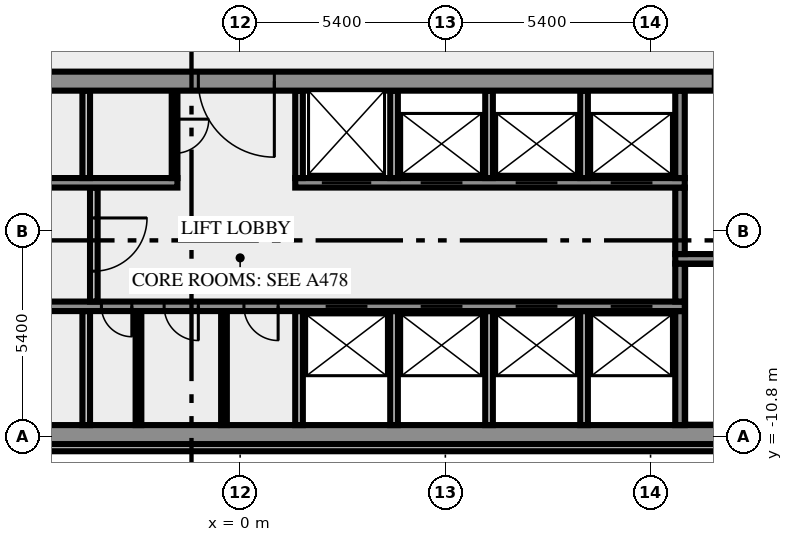
"""IFC4 building model, lengths in metres.
Left out: names, types, materials, properties, quantities, classifications, styles, units other than length and angle.
Written with IfcOpenShell. Run it as: python <this file> out.ifc"""

import sys

from ifc_helpers import new_model, si_unit, direction, frame, frame_2d, origin, place, context, subcontext, project, spatial, rectangle, extrude, element, fill, save


model = new_model("IFC4")
c1 = context("Model", 3, precision=1e-05, world=origin(), true_north=direction((0.0, 1.0)))
c2 = subcontext(c1, "Body", "Model", "MODEL_VIEW")
j1 = project(units=[si_unit("LENGTHUNIT", "METRE"), si_unit("PLANEANGLEUNIT", "RADIAN")], contexts=[c1])
p1 = place(None, origin())
s1 = spatial("IfcSite", under=j1, at=p1, CompositionType="ELEMENT")
p2 = place(p1, origin())
s2 = spatial("IfcBuilding", under=s1, at=p2, CompositionType="ELEMENT")
p3 = place(p2, frame((0.0, 0.0, 144.0)))
s3 = spatial("IfcBuildingStorey", under=s2, at=p3, CompositionType="ELEMENT", Elevation=144.0)
p4 = place(p3, frame((-17.444, -11.088, 0.0), z_axis=(0.0, 0.0, 1.0), x_axis=(1.0, 0.0, 0.0)))
e1 = element("IfcWall", 1, at=p4, inside=s3, PredefinedType="SOLIDWALL", context=c2, shape_type="SweptSolid", body=[
    extrude(rectangle(XDim=34.888, YDim=0.2, at=frame_2d((17.444, 0.0))), origin(), (0.0, 0.0, 1.0), 3.65),
])
p5 = place(p3, frame((-20.0, -10.75, 0.0), z_axis=(0.0, 0.0, 1.0), x_axis=(1.0, 0.0, 0.0)))
e2 = element("IfcWall", 2, at=p5, inside=s3, PredefinedType="SHEAR", context=c2, shape_type="SweptSolid", body=[
    extrude(rectangle(XDim=40.0, YDim=0.5, at=frame_2d((20.0, 0.0))), origin(), (0.0, 0.0, 1.0), 3.65),
])
p6 = place(p5, frame((0.8, 0.0, 1.0)))
e3 = element("IfcOpeningElement", 3, at=p6, cuts=e2, PredefinedType="OPENING", context=c2, shape_type="SweptSolid", body=[
    extrude(rectangle(XDim=1.2, YDim=1.2, at=frame_2d((0.6, 0.6))), frame((0.0, 0.26, 0.0), z_axis=(0.0, -1.0, 0.0), x_axis=(1.0, 0.0, 0.0)), (0.0, 0.0, 1.0), 0.52),
])
p7 = place(p5, frame((38.0, 0.0, 1.0)))
e4 = element("IfcOpeningElement", 4, at=p7, cuts=e2, PredefinedType="OPENING", context=c2, shape_type="SweptSolid", body=[
    extrude(rectangle(XDim=1.2, YDim=1.2, at=frame_2d((0.6, 0.6))), frame((0.0, 0.26, 0.0), z_axis=(0.0, -1.0, 0.0), x_axis=(1.0, 0.0, 0.0)), (0.0, 0.0, 1.0), 0.52),
])
p8 = place(p3, frame((-4.05, -10.5, 0.0), z_axis=(0.0, 0.0, 1.0), x_axis=(0.0, 1.0, 0.0)))
e5 = element("IfcWall", 5, at=p8, inside=s3, PredefinedType="SOLIDWALL", context=c2, shape_type="SweptSolid", body=[
    extrude(rectangle(XDim=3.0, YDim=0.2, at=frame_2d((1.5, 0.0))), origin(), (0.0, 0.0, 1.0), 3.65),
])
for number, where, z_axis, x_axis in (
    (6, (-2.675, -10.5, 0.0), (0.0, 0.0, 1.0), (0.0, 1.0, 0.0)),
    (7, (-0.425, -10.5, 0.0), (0.0, 0.0, 1.0), (0.0, 1.0, 0.0)),
):
    element("IfcWall", number, at=place(p3, frame(where, z_axis=z_axis, x_axis=x_axis)), inside=s3, PredefinedType="PARTITIONING", context=c2, shape_type="SweptSolid", body=[
        extrude(rectangle(XDim=3.0, YDim=0.15, at=frame_2d((1.5, 0.0))), origin(), (0.0, 0.0, 1.0), 3.65),
    ])
for number, where, z_axis, x_axis in (
    (8, (1.55, -10.5, 0.0), (0.0, 0.0, 1.0), (0.0, 1.0, 0.0)),
    (9, (4.05, -10.5, 0.0), (0.0, 0.0, 1.0), (0.0, 1.0, 0.0)),
    (10, (6.55, -10.5, 0.0), (0.0, 0.0, 1.0), (0.0, 1.0, 0.0)),
    (11, (9.05, -10.5, 0.0), (0.0, 0.0, 1.0), (0.0, 1.0, 0.0)),
):
    element("IfcWall", number, at=place(p3, frame(where, z_axis=z_axis, x_axis=x_axis)), inside=s3, PredefinedType="SOLIDWALL", context=c2, shape_type="SweptSolid", body=[
        extrude(rectangle(XDim=3.0, YDim=0.2, at=frame_2d((1.5, 0.0))), origin(), (0.0, 0.0, 1.0), 3.65),
    ])
p9 = place(p3, frame((11.575, -10.5, 0.0), z_axis=(0.0, 0.0, 1.0), x_axis=(0.0, 1.0, 0.0)))
e12 = element("IfcWall", 12, at=p9, inside=s3, PredefinedType="SHEAR", context=c2, shape_type="SweptSolid", body=[
    extrude(rectangle(XDim=3.0, YDim=0.25, at=frame_2d((1.5, 0.0))), origin(), (0.0, 0.0, 1.0), 3.65),
])
p10 = place(p3, frame((11.7, -7.375, 0.0), z_axis=(0.0, 0.0, 1.0), x_axis=(-1.0, 0.0, 0.0)))
e13 = element("IfcWall", 13, at=p10, inside=s3, PredefinedType="SHEAR", context=c2, shape_type="SweptSolid", body=[
    extrude(rectangle(XDim=23.4, YDim=0.25, at=frame_2d((11.7, 0.0))), origin(), (0.0, 0.0, 1.0), 3.65),
])
p11 = place(p10, frame((21.812, 0.0, 0.0)))
e14 = element("IfcOpeningElement", 14, at=p11, cuts=e13, PredefinedType="OPENING", context=c2, shape_type="SweptSolid", body=[
    extrude(rectangle(XDim=0.9, YDim=2.1, at=frame_2d((0.45, 1.05))), frame((0.0, 0.135, 0.0), z_axis=(0.0, -1.0, 0.0), x_axis=(1.0, 0.0, 0.0)), (0.0, 0.0, 1.0), 0.27),
])
p12 = place(p10, frame((19.55, 0.0, 0.0)))
e15 = element("IfcOpeningElement", 15, at=p12, cuts=e13, PredefinedType="OPENING", context=c2, shape_type="SweptSolid", body=[
    extrude(rectangle(XDim=0.9, YDim=2.1, at=frame_2d((0.45, 1.05))), frame((0.0, 0.135, 0.0), z_axis=(0.0, -1.0, 0.0), x_axis=(1.0, 0.0, 0.0)), (0.0, 0.0, 1.0), 0.27),
])
p13 = place(p10, frame((16.787, 0.0, 0.0)))
e16 = element("IfcOpeningElement", 16, at=p13, cuts=e13, PredefinedType="OPENING", context=c2, shape_type="SweptSolid", body=[
    extrude(rectangle(XDim=0.9, YDim=2.1, at=frame_2d((0.45, 1.05))), frame((0.0, 0.135, 0.0), z_axis=(0.0, -1.0, 0.0), x_axis=(1.0, 0.0, 0.0)), (0.0, 0.0, 1.0), 0.27),
])
p14 = place(p10, frame((14.55, 0.0, 0.0)))
e17 = element("IfcOpeningElement", 17, at=p14, cuts=e13, PredefinedType="OPENING", context=c2, shape_type="SweptSolid", body=[
    extrude(rectangle(XDim=0.8, YDim=2.1, at=frame_2d((0.4, 1.05))), frame((0.0, 0.135, 0.0), z_axis=(0.0, -1.0, 0.0), x_axis=(1.0, 0.0, 0.0)), (0.0, 0.0, 1.0), 0.27),
])
p15 = place(p10, frame((12.8, 0.0, 0.0)))
e18 = element("IfcOpeningElement", 18, at=p15, cuts=e13, PredefinedType="OPENING", context=c2, shape_type="SweptSolid", body=[
    extrude(rectangle(XDim=0.9, YDim=2.1, at=frame_2d((0.45, 1.05))), frame((0.0, 0.135, 0.0), z_axis=(0.0, -1.0, 0.0), x_axis=(1.0, 0.0, 0.0)), (0.0, 0.0, 1.0), 0.27),
])
p16 = place(p10, frame((10.7, 0.0, 0.0)))
e19 = element("IfcOpeningElement", 19, at=p16, cuts=e13, PredefinedType="OPENING", context=c2, shape_type="SweptSolid", body=[
    extrude(rectangle(XDim=0.9, YDim=2.1, at=frame_2d((0.45, 1.05))), frame((0.0, 0.135, 0.0), z_axis=(0.0, -1.0, 0.0), x_axis=(1.0, 0.0, 0.0)), (0.0, 0.0, 1.0), 0.27),
])
p17 = place(p10, frame((8.35, 0.0, 0.0)))
e20 = element("IfcOpeningElement", 20, at=p17, cuts=e13, PredefinedType="OPENING", context=c2, shape_type="SweptSolid", body=[
    extrude(rectangle(XDim=1.1, YDim=2.1, at=frame_2d((0.55, 1.05))), frame((0.0, 0.135, 0.0), z_axis=(0.0, -1.0, 0.0), x_axis=(1.0, 0.0, 0.0)), (0.0, 0.0, 1.0), 0.27),
])
p18 = place(p10, frame((5.85, 0.0, 0.0)))
e21 = element("IfcOpeningElement", 21, at=p18, cuts=e13, PredefinedType="OPENING", context=c2, shape_type="SweptSolid", body=[
    extrude(rectangle(XDim=1.1, YDim=2.1, at=frame_2d((0.55, 1.05))), frame((0.0, 0.135, 0.0), z_axis=(0.0, -1.0, 0.0), x_axis=(1.0, 0.0, 0.0)), (0.0, 0.0, 1.0), 0.27),
])
p19 = place(p10, frame((3.35, 0.0, 0.0)))
e22 = element("IfcOpeningElement", 22, at=p19, cuts=e13, PredefinedType="OPENING", context=c2, shape_type="SweptSolid", body=[
    extrude(rectangle(XDim=1.1, YDim=2.1, at=frame_2d((0.55, 1.05))), frame((0.0, 0.135, 0.0), z_axis=(0.0, -1.0, 0.0), x_axis=(1.0, 0.0, 0.0)), (0.0, 0.0, 1.0), 0.27),
])
p20 = place(p10, frame((0.85, 0.0, 0.0)))
e23 = element("IfcOpeningElement", 23, at=p20, cuts=e13, PredefinedType="OPENING", context=c2, shape_type="SweptSolid", body=[
    extrude(rectangle(XDim=1.1, YDim=2.1, at=frame_2d((0.55, 1.05))), frame((0.0, 0.135, 0.0), z_axis=(0.0, -1.0, 0.0), x_axis=(1.0, 0.0, 0.0)), (0.0, 0.0, 1.0), 0.27),
])
p21 = place(p3, frame((-3.85, -4.25, 0.0), z_axis=(0.0, 0.0, 1.0), x_axis=(0.0, -1.0, 0.0)))
e24 = element("IfcWall", 24, at=p21, inside=s3, PredefinedType="SOLIDWALL", context=c2, shape_type="SweptSolid", body=[
    extrude(rectangle(XDim=3.0, YDim=0.2, at=frame_2d((1.5, 0.0))), origin(), (0.0, 0.0, 1.0), 3.65),
])
p22 = place(p21, frame((0.8, 0.0, 0.0)))
e25 = element("IfcOpeningElement", 25, at=p22, cuts=e24, PredefinedType="OPENING", context=c2, shape_type="SweptSolid", body=[
    extrude(rectangle(XDim=1.4, YDim=2.1, at=frame_2d((0.7, 1.05))), frame((0.0, 0.11, 0.0), z_axis=(0.0, -1.0, 0.0), x_axis=(1.0, 0.0, 0.0)), (0.0, 0.0, 1.0), 0.22),
])
p23 = place(p3, frame((11.575, -7.25, 0.0), z_axis=(0.0, 0.0, 1.0), x_axis=(0.0, 1.0, 0.0)))
e26 = element("IfcWall", 26, at=p23, inside=s3, PredefinedType="SHEAR", context=c2, shape_type="SweptSolid", body=[
    extrude(rectangle(XDim=1.0, YDim=0.25, at=frame_2d((0.5, 0.0))), origin(), (0.0, 0.0, 1.0), 3.65),
])
p24 = place(p3, frame((19.5, -6.125, 0.0), z_axis=(0.0, 0.0, 1.0), x_axis=(-1.0, 0.0, 0.0)))
e27 = element("IfcWall", 27, at=p24, inside=s3, PredefinedType="SHEAR", context=c2, shape_type="SweptSolid", body=[
    extrude(rectangle(XDim=8.05, YDim=0.25, at=frame_2d((4.025, 0.0))), origin(), (0.0, 0.0, 1.0), 3.65),
])
p25 = place(p24, frame((0.05, 0.0, 0.0)))
e28 = element("IfcOpeningElement", 28, at=p25, cuts=e27, PredefinedType="OPENING", context=c2, shape_type="SweptSolid", body=[
    extrude(rectangle(XDim=1.8, YDim=2.1, at=frame_2d((0.9, 1.05))), frame((0.0, 0.135, 0.0), z_axis=(0.0, -1.0, 0.0), x_axis=(1.0, 0.0, 0.0)), (0.0, 0.0, 1.0), 0.27),
])
p26 = place(p3, frame((11.575, -6.0, 0.0), z_axis=(0.0, 0.0, 1.0), x_axis=(0.0, 1.0, 0.0)))
e29 = element("IfcWall", 29, at=p26, inside=s3, PredefinedType="SHEAR", context=c2, shape_type="SweptSolid", body=[
    extrude(rectangle(XDim=1.75, YDim=0.25, at=frame_2d((0.875, 0.0))), origin(), (0.0, 0.0, 1.0), 3.65),
])
p27 = place(p3, frame((-11.7, -4.125, 0.0), z_axis=(0.0, 0.0, 1.0), x_axis=(1.0, 0.0, 0.0)))
e30 = element("IfcWall", 30, at=p27, inside=s3, PredefinedType="SHEAR", context=c2, shape_type="SweptSolid", body=[
    extrude(rectangle(XDim=10.05, YDim=0.25, at=frame_2d((5.025, 0.0))), origin(), (0.0, 0.0, 1.0), 3.65),
])
p28 = place(p3, frame((1.45, -4.125, 0.0), z_axis=(0.0, 0.0, 1.0), x_axis=(1.0, 0.0, 0.0)))
e31 = element("IfcWall", 31, at=p28, inside=s3, PredefinedType="SHEAR", context=c2, shape_type="SweptSolid", body=[
    extrude(rectangle(XDim=10.25, YDim=0.25, at=frame_2d((5.125, 0.0))), origin(), (0.0, 0.0, 1.0), 3.65),
])
p29 = place(p28, frame((0.7, 0.0, 0.0)))
e32 = element("IfcOpeningElement", 32, at=p29, cuts=e31, PredefinedType="OPENING", context=c2, shape_type="SweptSolid", body=[
    extrude(rectangle(XDim=1.3, YDim=2.1, at=frame_2d((0.65, 1.05))), frame((0.0, 0.135, 0.0), z_axis=(0.0, -1.0, 0.0), x_axis=(1.0, 0.0, 0.0)), (0.0, 0.0, 1.0), 0.27),
])
p30 = place(p28, frame((3.3, 0.0, 0.0)))
e33 = element("IfcOpeningElement", 33, at=p30, cuts=e31, PredefinedType="OPENING", context=c2, shape_type="SweptSolid", body=[
    extrude(rectangle(XDim=1.1, YDim=2.1, at=frame_2d((0.55, 1.05))), frame((0.0, 0.135, 0.0), z_axis=(0.0, -1.0, 0.0), x_axis=(1.0, 0.0, 0.0)), (0.0, 0.0, 1.0), 0.27),
])
p31 = place(p28, frame((5.8, 0.0, 0.0)))
e34 = element("IfcOpeningElement", 34, at=p31, cuts=e31, PredefinedType="OPENING", context=c2, shape_type="SweptSolid", body=[
    extrude(rectangle(XDim=1.1, YDim=2.1, at=frame_2d((0.55, 1.05))), frame((0.0, 0.135, 0.0), z_axis=(0.0, -1.0, 0.0), x_axis=(1.0, 0.0, 0.0)), (0.0, 0.0, 1.0), 0.27),
])
p32 = place(p28, frame((8.3, 0.0, 0.0)))
e35 = element("IfcOpeningElement", 35, at=p32, cuts=e31, PredefinedType="OPENING", context=c2, shape_type="SweptSolid", body=[
    extrude(rectangle(XDim=1.1, YDim=2.1, at=frame_2d((0.55, 1.05))), frame((0.0, 0.135, 0.0), z_axis=(0.0, -1.0, 0.0), x_axis=(1.0, 0.0, 0.0)), (0.0, 0.0, 1.0), 0.27),
])
p33 = place(p3, frame((-4.05, -4.0, 0.0), z_axis=(0.0, 0.0, 1.0), x_axis=(0.0, 1.0, 0.0)))
e36 = element("IfcWall", 36, at=p33, inside=s3, PredefinedType="SOLIDWALL", context=c2, shape_type="SweptSolid", body=[
    extrude(rectangle(XDim=2.3, YDim=0.2, at=frame_2d((1.15, 0.0))), origin(), (0.0, 0.0, 1.0), 3.65),
])
p34 = place(p3, frame((-1.725, -1.7, 0.0), z_axis=(0.0, 0.0, 1.0), x_axis=(0.0, -1.0, 0.0)))
e37 = element("IfcWall", 37, at=p34, inside=s3, PredefinedType="PARTITIONING", context=c2, shape_type="SweptSolid", body=[
    extrude(rectangle(XDim=2.3, YDim=0.15, at=frame_2d((1.15, 0.0))), origin(), (0.0, 0.0, 1.0), 3.65),
])
p35 = place(p34, frame((0.75, 0.0, 0.0)))
e38 = element("IfcOpeningElement", 38, at=p35, cuts=e37, PredefinedType="OPENING", context=c2, shape_type="SweptSolid", body=[
    extrude(rectangle(XDim=0.9, YDim=2.1, at=frame_2d((0.45, 1.05))), frame((0.0, 0.085, 0.0), z_axis=(0.0, -1.0, 0.0), x_axis=(1.0, 0.0, 0.0)), (0.0, 0.0, 1.0), 0.17),
])
for number, where, z_axis, x_axis in (
    (39, (1.55, -4.0, 0.0), (0.0, 0.0, 1.0), (0.0, 1.0, 0.0)),
    (40, (4.05, -4.0, 0.0), (0.0, 0.0, 1.0), (0.0, 1.0, 0.0)),
    (41, (6.55, -4.0, 0.0), (0.0, 0.0, 1.0), (0.0, 1.0, 0.0)),
    (42, (9.05, -4.0, 0.0), (0.0, 0.0, 1.0), (0.0, 1.0, 0.0)),
):
    element("IfcWall", number, at=place(p3, frame(where, z_axis=z_axis, x_axis=x_axis)), inside=s3, PredefinedType="SOLIDWALL", context=c2, shape_type="SweptSolid", body=[
        extrude(rectangle(XDim=2.3, YDim=0.2, at=frame_2d((1.15, 0.0))), origin(), (0.0, 0.0, 1.0), 3.65),
    ])
p36 = place(p3, frame((11.575, -4.0, 0.0), z_axis=(0.0, 0.0, 1.0), x_axis=(0.0, 1.0, 0.0)))
e43 = element("IfcWall", 43, at=p36, inside=s3, PredefinedType="SHEAR", context=c2, shape_type="SweptSolid", body=[
    extrude(rectangle(XDim=2.3, YDim=0.25, at=frame_2d((1.15, 0.0))), origin(), (0.0, 0.0, 1.0), 3.65),
])
p37 = place(p3, frame((20.49, -1.45, 0.0), z_axis=(0.0, 0.0, 1.0), x_axis=(-1.0, 0.0, 0.0)))
e44 = element("IfcWall", 44, at=p37, inside=s3, PredefinedType="SHEAR", context=c2, shape_type="SweptSolid", body=[
    extrude(rectangle(XDim=40.98, YDim=0.5, at=frame_2d((20.49, 0.0))), origin(), (0.0, 0.0, 1.0), 3.65),
])
p38 = place(p37, frame((38.14, 0.0, 0.0)))
e45 = element("IfcOpeningElement", 45, at=p38, cuts=e44, PredefinedType="OPENING", context=c2, shape_type="SweptSolid", body=[
    extrude(rectangle(XDim=1.8, YDim=2.1, at=frame_2d((0.9, 1.05))), frame((0.0, 0.26, 0.0), z_axis=(0.0, -1.0, 0.0), x_axis=(1.0, 0.0, 0.0)), (0.0, 0.0, 1.0), 0.52),
])
p39 = place(p37, frame((35.89, 0.0, 0.0)))
e46 = element("IfcOpeningElement", 46, at=p39, cuts=e44, PredefinedType="OPENING", context=c2, shape_type="SweptSolid", body=[
    extrude(rectangle(XDim=0.9, YDim=2.1, at=frame_2d((0.45, 1.05))), frame((0.0, 0.26, 0.0), z_axis=(0.0, -1.0, 0.0), x_axis=(1.0, 0.0, 0.0)), (0.0, 0.0, 1.0), 0.52),
])
p40 = place(p37, frame((32.94, 0.0, 0.0)))
e47 = element("IfcOpeningElement", 47, at=p40, cuts=e44, PredefinedType="OPENING", context=c2, shape_type="SweptSolid", body=[
    extrude(rectangle(XDim=0.9, YDim=2.1, at=frame_2d((0.45, 1.05))), frame((0.0, 0.26, 0.0), z_axis=(0.0, -1.0, 0.0), x_axis=(1.0, 0.0, 0.0)), (0.0, 0.0, 1.0), 0.52),
])
p41 = place(p37, frame((29.802, 0.0, 0.0)))
e48 = element("IfcOpeningElement", 48, at=p41, cuts=e44, PredefinedType="OPENING", context=c2, shape_type="SweptSolid", body=[
    extrude(rectangle(XDim=0.9, YDim=2.1, at=frame_2d((0.45, 1.05))), frame((0.0, 0.26, 0.0), z_axis=(0.0, -1.0, 0.0), x_axis=(1.0, 0.0, 0.0)), (0.0, 0.0, 1.0), 0.52),
])
p42 = place(p37, frame((26.077, 0.0, 0.0)))
e49 = element("IfcOpeningElement", 49, at=p42, cuts=e44, PredefinedType="OPENING", context=c2, shape_type="SweptSolid", body=[
    extrude(rectangle(XDim=0.9, YDim=2.1, at=frame_2d((0.45, 1.05))), frame((0.0, 0.26, 0.0), z_axis=(0.0, -1.0, 0.0), x_axis=(1.0, 0.0, 0.0)), (0.0, 0.0, 1.0), 0.52),
])
p43 = place(p37, frame((19.59, 0.0, 0.0)))
e50 = element("IfcOpeningElement", 50, at=p43, cuts=e44, PredefinedType="OPENING", context=c2, shape_type="SweptSolid", body=[
    extrude(rectangle(XDim=2.0, YDim=2.1, at=frame_2d((1.0, 1.05))), frame((0.0, 0.26, 0.0), z_axis=(0.0, -1.0, 0.0), x_axis=(1.0, 0.0, 0.0)), (0.0, 0.0, 1.0), 0.52),
])
p44 = place(p37, frame((7.14, 0.0, 0.0)))
e51 = element("IfcOpeningElement", 51, at=p44, cuts=e44, PredefinedType="OPENING", context=c2, shape_type="SweptSolid", body=[
    extrude(rectangle(XDim=0.9, YDim=2.1, at=frame_2d((0.45, 1.05))), frame((0.0, 0.26, 0.0), z_axis=(0.0, -1.0, 0.0), x_axis=(1.0, 0.0, 0.0)), (0.0, 0.0, 1.0), 0.52),
])
p45 = place(p37, frame((5.028, 0.0, 0.0)))
e52 = element("IfcOpeningElement", 52, at=p45, cuts=e44, PredefinedType="OPENING", context=c2, shape_type="SweptSolid", body=[
    extrude(rectangle(XDim=0.8, YDim=2.1, at=frame_2d((0.4, 1.05))), frame((0.0, 0.26, 0.0), z_axis=(0.0, -1.0, 0.0), x_axis=(1.0, 0.0, 0.0)), (0.0, 0.0, 1.0), 0.52),
])
p46 = place(p37, frame((3.452, 0.0, 0.0)))
e53 = element("IfcOpeningElement", 53, at=p46, cuts=e44, PredefinedType="OPENING", context=c2, shape_type="SweptSolid", body=[
    extrude(rectangle(XDim=0.8, YDim=2.1, at=frame_2d((0.4, 1.05))), frame((0.0, 0.26, 0.0), z_axis=(0.0, -1.0, 0.0), x_axis=(1.0, 0.0, 0.0)), (0.0, 0.0, 1.0), 0.52),
])
p47 = place(p37, frame((1.04, 0.0, 0.0)))
e54 = element("IfcOpeningElement", 54, at=p47, cuts=e44, PredefinedType="OPENING", context=c2, shape_type="SweptSolid", body=[
    extrude(rectangle(XDim=1.8, YDim=2.1, at=frame_2d((0.9, 1.05))), frame((0.0, 0.26, 0.0), z_axis=(0.0, -1.0, 0.0), x_axis=(1.0, 0.0, 0.0)), (0.0, 0.0, 1.0), 0.52),
])
p48 = place(p14, origin())
e55 = element("IfcDoor", 55, at=p48, inside=s3, OperationType="SINGLE_SWING_RIGHT", PredefinedType="DOOR", context=c2, shape_type="SweptSolid", body=[
    extrude(rectangle(XDim=0.8, YDim=2.1, at=frame_2d((0.4, 1.05))), frame((0.0, 0.025, 0.0), z_axis=(0.0, -1.0, 0.0), x_axis=(1.0, 0.0, 0.0)), (0.0, 0.0, 1.0), 0.05),
])
fill(e17, e55)
p49 = place(p15, origin())
e56 = element("IfcDoor", 56, at=p49, inside=s3, OperationType="SINGLE_SWING_RIGHT", PredefinedType="DOOR", context=c2, shape_type="SweptSolid", body=[
    extrude(rectangle(XDim=0.9, YDim=2.1, at=frame_2d((0.45, 1.05))), frame((0.0, 0.025, 0.0), z_axis=(0.0, -1.0, 0.0), x_axis=(1.0, 0.0, 0.0)), (0.0, 0.0, 1.0), 0.05),
])
fill(e18, e56)
p50 = place(p16, origin())
e57 = element("IfcDoor", 57, at=p50, inside=s3, OperationType="SINGLE_SWING_LEFT", PredefinedType="DOOR", context=c2, shape_type="SweptSolid", body=[
    extrude(rectangle(XDim=0.9, YDim=2.1, at=frame_2d((0.45, 1.05))), frame((0.0, 0.025, 0.0), z_axis=(0.0, -1.0, 0.0), x_axis=(1.0, 0.0, 0.0)), (0.0, 0.0, 1.0), 0.05),
])
fill(e19, e57)
p51 = place(p17, origin())
e58 = element("IfcDoor", 58, at=p51, inside=s3, OperationType="DOUBLE_DOOR_SLIDING", PredefinedType="DOOR", context=c2, shape_type="SweptSolid", body=[
    extrude(rectangle(XDim=1.1, YDim=2.1, at=frame_2d((0.55, 1.05))), frame((0.0, 0.025, 0.0), z_axis=(0.0, -1.0, 0.0), x_axis=(1.0, 0.0, 0.0)), (0.0, 0.0, 1.0), 0.05),
])
fill(e20, e58)
p52 = place(p18, origin())
e59 = element("IfcDoor", 59, at=p52, inside=s3, OperationType="DOUBLE_DOOR_SLIDING", PredefinedType="DOOR", context=c2, shape_type="SweptSolid", body=[
    extrude(rectangle(XDim=1.1, YDim=2.1, at=frame_2d((0.55, 1.05))), frame((0.0, 0.025, 0.0), z_axis=(0.0, -1.0, 0.0), x_axis=(1.0, 0.0, 0.0)), (0.0, 0.0, 1.0), 0.05),
])
fill(e21, e59)
p53 = place(p19, origin())
e60 = element("IfcDoor", 60, at=p53, inside=s3, OperationType="DOUBLE_DOOR_SLIDING", PredefinedType="DOOR", context=c2, shape_type="SweptSolid", body=[
    extrude(rectangle(XDim=1.1, YDim=2.1, at=frame_2d((0.55, 1.05))), frame((0.0, 0.025, 0.0), z_axis=(0.0, -1.0, 0.0), x_axis=(1.0, 0.0, 0.0)), (0.0, 0.0, 1.0), 0.05),
])
fill(e22, e60)
p54 = place(p20, origin())
e61 = element("IfcDoor", 61, at=p54, inside=s3, OperationType="DOUBLE_DOOR_SLIDING", PredefinedType="DOOR", context=c2, shape_type="SweptSolid", body=[
    extrude(rectangle(XDim=1.1, YDim=2.1, at=frame_2d((0.55, 1.05))), frame((0.0, 0.025, 0.0), z_axis=(0.0, -1.0, 0.0), x_axis=(1.0, 0.0, 0.0)), (0.0, 0.0, 1.0), 0.05),
])
fill(e23, e61)
p55 = place(p22, origin())
e62 = element("IfcDoor", 62, at=p55, inside=s3, OperationType="DOUBLE_DOOR_SINGLE_SWING", PredefinedType="DOOR", context=c2, shape_type="SweptSolid", body=[
    extrude(rectangle(XDim=1.4, YDim=2.1, at=frame_2d((0.7, 1.05))), frame((0.0, 0.025, 0.0), z_axis=(0.0, -1.0, 0.0), x_axis=(1.0, 0.0, 0.0)), (0.0, 0.0, 1.0), 0.05),
])
fill(e25, e62)
p56 = place(p29, origin())
e63 = element("IfcDoor", 63, at=p56, inside=s3, OperationType="DOUBLE_DOOR_SLIDING", PredefinedType="DOOR", context=c2, shape_type="SweptSolid", body=[
    extrude(rectangle(XDim=1.3, YDim=2.1, at=frame_2d((0.65, 1.05))), frame((0.0, 0.025, 0.0), z_axis=(0.0, -1.0, 0.0), x_axis=(1.0, 0.0, 0.0)), (0.0, 0.0, 1.0), 0.05),
])
fill(e32, e63)
p57 = place(p30, origin())
e64 = element("IfcDoor", 64, at=p57, inside=s3, OperationType="DOUBLE_DOOR_SLIDING", PredefinedType="DOOR", context=c2, shape_type="SweptSolid", body=[
    extrude(rectangle(XDim=1.1, YDim=2.1, at=frame_2d((0.55, 1.05))), frame((0.0, 0.025, 0.0), z_axis=(0.0, -1.0, 0.0), x_axis=(1.0, 0.0, 0.0)), (0.0, 0.0, 1.0), 0.05),
])
fill(e33, e64)
p58 = place(p31, origin())
e65 = element("IfcDoor", 65, at=p58, inside=s3, OperationType="DOUBLE_DOOR_SLIDING", PredefinedType="DOOR", context=c2, shape_type="SweptSolid", body=[
    extrude(rectangle(XDim=1.1, YDim=2.1, at=frame_2d((0.55, 1.05))), frame((0.0, 0.025, 0.0), z_axis=(0.0, -1.0, 0.0), x_axis=(1.0, 0.0, 0.0)), (0.0, 0.0, 1.0), 0.05),
])
fill(e34, e65)
p59 = place(p32, origin())
e66 = element("IfcDoor", 66, at=p59, inside=s3, OperationType="DOUBLE_DOOR_SLIDING", PredefinedType="DOOR", context=c2, shape_type="SweptSolid", body=[
    extrude(rectangle(XDim=1.1, YDim=2.1, at=frame_2d((0.55, 1.05))), frame((0.0, 0.025, 0.0), z_axis=(0.0, -1.0, 0.0), x_axis=(1.0, 0.0, 0.0)), (0.0, 0.0, 1.0), 0.05),
])
fill(e35, e66)
p60 = place(p35, origin())
e67 = element("IfcDoor", 67, at=p60, inside=s3, OperationType="SINGLE_SWING_RIGHT", PredefinedType="DOOR", context=c2, shape_type="SweptSolid", body=[
    extrude(rectangle(XDim=0.9, YDim=2.1, at=frame_2d((0.45, 1.05))), frame((0.0, 0.025, 0.0), z_axis=(0.0, -1.0, 0.0), x_axis=(1.0, 0.0, 0.0)), (0.0, 0.0, 1.0), 0.05),
])
fill(e38, e67)
p61 = place(p43, origin())
e68 = element("IfcDoor", 68, at=p61, inside=s3, OperationType="DOUBLE_DOOR_SINGLE_SWING", PredefinedType="DOOR", context=c2, shape_type="SweptSolid", body=[
    extrude(rectangle(XDim=2.0, YDim=2.1, at=frame_2d((1.0, 1.05))), frame((0.0, 0.025, 0.0), z_axis=(0.0, -1.0, 0.0), x_axis=(1.0, 0.0, 0.0)), (0.0, 0.0, 1.0), 0.05),
])
fill(e50, e68)
save(model, sys.argv[1])
